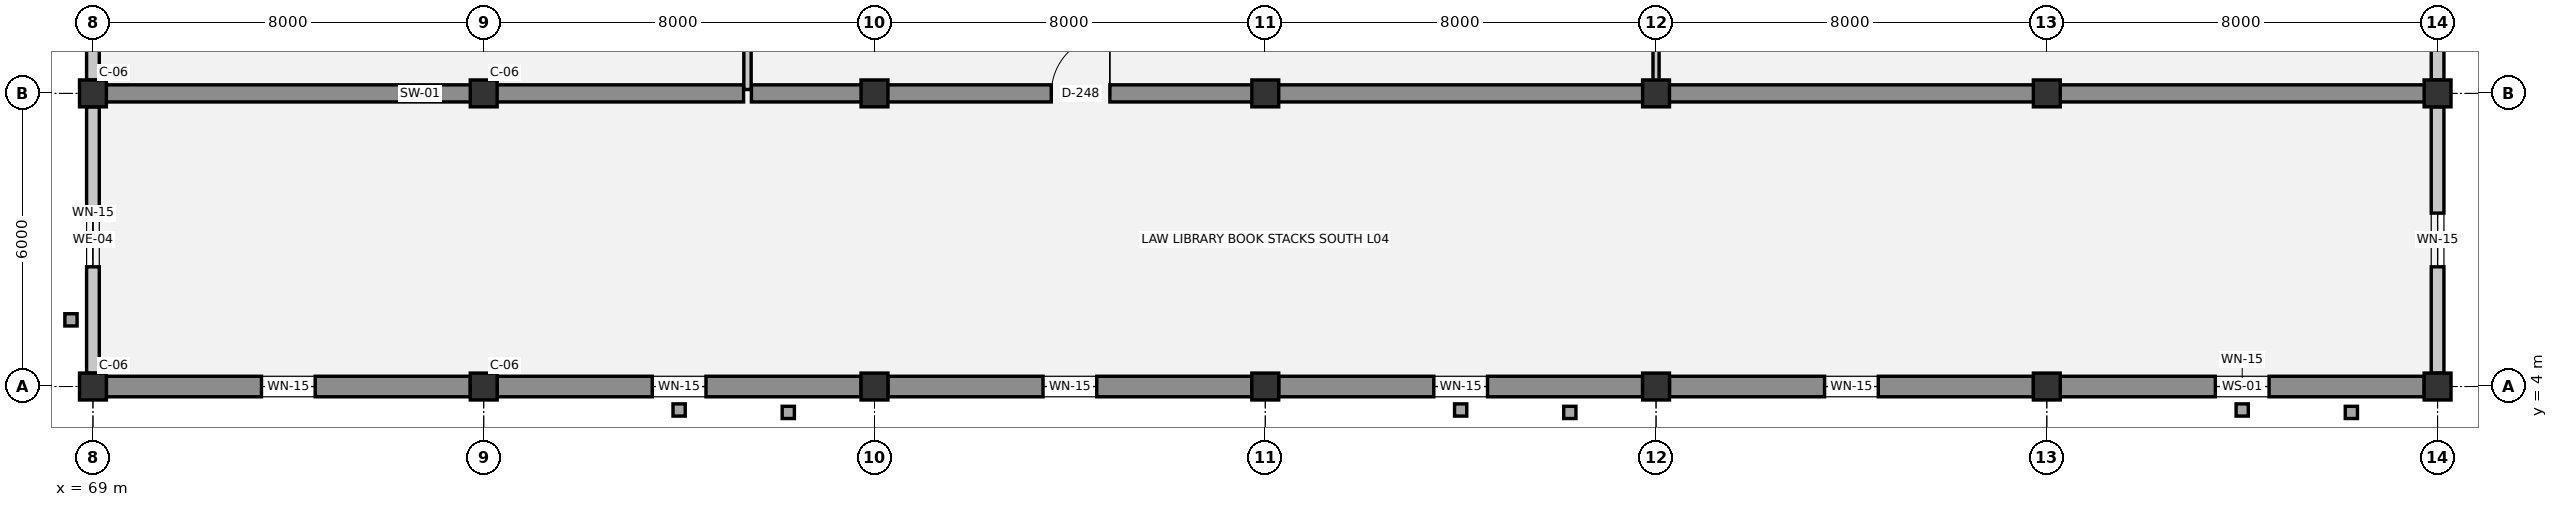
"""IFC4 building model, lengths in metres.
Left out: names, types, materials, properties, quantities, classifications, styles, units other than length and angle.
Written with IfcOpenShell. Run it as: python <this file> out.ifc"""

import sys

from ifc_helpers import new_model, si_unit, direction, frame, frame_2d, origin, origin_2d, place, context, subcontext, project, spatial, rectangle, extrude, element, fill, save


model = new_model("IFC4")
c1 = context("Model", 3, precision=1e-05, world=origin(), true_north=direction((0.0, 1.0)))
c2 = subcontext(c1, "Body", "Model", "MODEL_VIEW")
j1 = project(units=[si_unit("LENGTHUNIT", "METRE"), si_unit("PLANEANGLEUNIT", "RADIAN")], contexts=[c1])
p1 = place(None, origin())
s1 = spatial("IfcSite", under=j1, at=p1, CompositionType="ELEMENT")
p2 = place(p1, origin())
s2 = spatial("IfcBuilding", under=s1, at=p2, CompositionType="ELEMENT")
p3 = place(p2, frame((0.0, 0.0, 14.4)))
s3 = spatial("IfcBuildingStorey", under=s2, at=p3, CompositionType="ELEMENT", Elevation=14.4)
for number, where, z_axis, x_axis in (
    (1, (69.0, 4.0, 0.0), (0.0, 0.0, 1.0), (1.0, 0.0, 0.0)),
    (2, (69.0, 10.0, 0.0), (0.0, 0.0, 1.0), (1.0, 0.0, 0.0)),
    (3, (77.0, 4.0, 0.0), (0.0, 0.0, 1.0), (1.0, 0.0, 0.0)),
    (4, (77.0, 10.0, 0.0), (0.0, 0.0, 1.0), (1.0, 0.0, 0.0)),
    (5, (85.0, 4.0, 0.0), (0.0, 0.0, 1.0), (1.0, 0.0, 0.0)),
    (6, (85.0, 10.0, 0.0), (0.0, 0.0, 1.0), (1.0, 0.0, 0.0)),
    (7, (93.0, 4.0, 0.0), (0.0, 0.0, 1.0), (1.0, 0.0, 0.0)),
    (8, (93.0, 10.0, 0.0), (0.0, 0.0, 1.0), (1.0, 0.0, 0.0)),
    (9, (101.0, 4.0, 0.0), (0.0, 0.0, 1.0), (1.0, 0.0, 0.0)),
    (10, (101.0, 10.0, 0.0), (0.0, 0.0, 1.0), (1.0, 0.0, 0.0)),
    (11, (109.0, 4.0, 0.0), (0.0, 0.0, 1.0), (1.0, 0.0, 0.0)),
    (12, (109.0, 10.0, 0.0), (0.0, 0.0, 1.0), (1.0, 0.0, 0.0)),
    (13, (117.0, 4.0, 0.0), (0.0, 0.0, 1.0), (1.0, 0.0, 0.0)),
    (14, (117.0, 10.0, 0.0), (0.0, 0.0, 1.0), (1.0, 0.0, 0.0)),
):
    element("IfcColumn", number, at=place(p3, frame(where, z_axis=z_axis, x_axis=x_axis)), inside=s3, PredefinedType="COLUMN", context=c2, shape_type="SweptSolid", body=[
        extrude(rectangle(XDim=0.55, YDim=0.55, at=origin_2d()), origin(), (0.0, 0.0, 1.0), 3.9),
    ])
p4 = place(p3, frame((69.0, 4.275, 0.0), z_axis=(0.0, 0.0, 1.0), x_axis=(0.0, 1.0, 0.0)))
e15 = element("IfcWall", 15, at=p4, inside=s3, PredefinedType="SOLIDWALL", context=c2, shape_type="SweptSolid", body=[
    extrude(rectangle(XDim=5.45, YDim=0.26, at=frame_2d((2.725, 0.0))), origin(), (0.0, 0.0, 1.0), 2.84),
])
p5 = place(p4, frame((2.175, 0.0, 0.9)))
e16 = element("IfcOpeningElement", 16, at=p5, cuts=e15, PredefinedType="OPENING", context=c2, shape_type="SweptSolid", body=[
    extrude(rectangle(XDim=1.1, YDim=1.2, at=frame_2d((0.55, 0.6))), frame((0.0, 0.14, 0.0), z_axis=(0.0, -1.0, 0.0), x_axis=(1.0, 0.0, 0.0)), (0.0, 0.0, 1.0), 0.28),
])
p6 = place(p3, frame((69.0, 10.275, 0.0), z_axis=(0.0, 0.0, 1.0), x_axis=(0.0, 1.0, 0.0)))
e17 = element("IfcWall", 17, at=p6, inside=s3, PredefinedType="SOLIDWALL", context=c2, shape_type="SweptSolid", body=[
    extrude(rectangle(XDim=6.45, YDim=0.26, at=frame_2d((3.225, 0.0))), origin(), (0.0, 0.0, 1.0), 2.84),
])
p7 = place(p6, frame((2.125, 0.0, 0.9)))
e18 = element("IfcOpeningElement", 18, at=p7, cuts=e17, PredefinedType="OPENING", context=c2, shape_type="SweptSolid", body=[
    extrude(rectangle(XDim=2.2, YDim=1.0, at=frame_2d((1.1, 0.5))), frame((0.0, 0.14, 0.0), z_axis=(0.0, -1.0, 0.0), x_axis=(1.0, 0.0, 0.0)), (0.0, 0.0, 1.0), 0.28),
])
p8 = place(p3, frame((117.0, 16.725, 0.0), z_axis=(0.0, 0.0, 1.0), x_axis=(0.0, -1.0, 0.0)))
e19 = element("IfcWall", 19, at=p8, inside=s3, PredefinedType="SOLIDWALL", context=c2, shape_type="SweptSolid", body=[
    extrude(rectangle(XDim=6.45, YDim=0.26, at=frame_2d((3.225, 0.0))), origin(), (0.0, 0.0, 1.0), 2.84),
])
p9 = place(p8, frame((2.125, 0.0, 0.9)))
e20 = element("IfcOpeningElement", 20, at=p9, cuts=e19, PredefinedType="OPENING", context=c2, shape_type="SweptSolid", body=[
    extrude(rectangle(XDim=2.2, YDim=1.0, at=frame_2d((1.1, 0.5))), frame((0.0, 0.14, 0.0), z_axis=(0.0, -1.0, 0.0), x_axis=(1.0, 0.0, 0.0)), (0.0, 0.0, 1.0), 0.28),
])
p10 = place(p3, frame((117.0, 9.725, 0.0), z_axis=(0.0, 0.0, 1.0), x_axis=(0.0, -1.0, 0.0)))
e21 = element("IfcWall", 21, at=p10, inside=s3, PredefinedType="SOLIDWALL", context=c2, shape_type="SweptSolid", body=[
    extrude(rectangle(XDim=5.45, YDim=0.26, at=frame_2d((2.725, 0.0))), origin(), (0.0, 0.0, 1.0), 2.84),
])
p11 = place(p10, frame((2.175, 0.0, 0.9)))
e22 = element("IfcOpeningElement", 22, at=p11, cuts=e21, PredefinedType="OPENING", context=c2, shape_type="SweptSolid", body=[
    extrude(rectangle(XDim=1.1, YDim=1.2, at=frame_2d((0.55, 0.6))), frame((0.0, 0.14, 0.0), z_axis=(0.0, -1.0, 0.0), x_axis=(1.0, 0.0, 0.0)), (0.0, 0.0, 1.0), 0.28),
])
p12 = place(p3, frame((116.725, 4.0, 0.0), z_axis=(0.0, 0.0, 1.0), x_axis=(-1.0, 0.0, 0.0)))
e23 = element("IfcWall", 23, at=p12, inside=s3, PredefinedType="SOLIDWALL", context=c2, shape_type="SweptSolid", body=[
    extrude(rectangle(XDim=7.45, YDim=0.42, at=frame_2d((3.725, 0.0))), origin(), (0.0, 0.0, 1.0), 2.84),
])
p13 = place(p12, frame((3.175, 0.0, 0.9)))
e24 = element("IfcOpeningElement", 24, at=p13, cuts=e23, PredefinedType="OPENING", context=c2, shape_type="SweptSolid", body=[
    extrude(rectangle(XDim=1.1, YDim=1.2, at=frame_2d((0.55, 0.6))), frame((0.0, 0.22, 0.0), z_axis=(0.0, -1.0, 0.0), x_axis=(1.0, 0.0, 0.0)), (0.0, 0.0, 1.0), 0.44),
])
p14 = place(p3, frame((108.725, 4.0, 0.0), z_axis=(0.0, 0.0, 1.0), x_axis=(-1.0, 0.0, 0.0)))
e25 = element("IfcWall", 25, at=p14, inside=s3, PredefinedType="SOLIDWALL", context=c2, shape_type="SweptSolid", body=[
    extrude(rectangle(XDim=7.45, YDim=0.42, at=frame_2d((3.725, 0.0))), origin(), (0.0, 0.0, 1.0), 2.84),
])
p15 = place(p14, frame((3.175, 0.0, 0.9)))
e26 = element("IfcOpeningElement", 26, at=p15, cuts=e25, PredefinedType="OPENING", context=c2, shape_type="SweptSolid", body=[
    extrude(rectangle(XDim=1.1, YDim=1.2, at=frame_2d((0.55, 0.6))), frame((0.0, 0.22, 0.0), z_axis=(0.0, -1.0, 0.0), x_axis=(1.0, 0.0, 0.0)), (0.0, 0.0, 1.0), 0.44),
])
p16 = place(p3, frame((100.725, 4.0, 0.0), z_axis=(0.0, 0.0, 1.0), x_axis=(-1.0, 0.0, 0.0)))
e27 = element("IfcWall", 27, at=p16, inside=s3, PredefinedType="SOLIDWALL", context=c2, shape_type="SweptSolid", body=[
    extrude(rectangle(XDim=7.45, YDim=0.42, at=frame_2d((3.725, 0.0))), origin(), (0.0, 0.0, 1.0), 2.84),
])
p17 = place(p16, frame((3.175, 0.0, 0.9)))
e28 = element("IfcOpeningElement", 28, at=p17, cuts=e27, PredefinedType="OPENING", context=c2, shape_type="SweptSolid", body=[
    extrude(rectangle(XDim=1.1, YDim=1.2, at=frame_2d((0.55, 0.6))), frame((0.0, 0.22, 0.0), z_axis=(0.0, -1.0, 0.0), x_axis=(1.0, 0.0, 0.0)), (0.0, 0.0, 1.0), 0.44),
])
p18 = place(p3, frame((92.725, 4.0, 0.0), z_axis=(0.0, 0.0, 1.0), x_axis=(-1.0, 0.0, 0.0)))
e29 = element("IfcWall", 29, at=p18, inside=s3, PredefinedType="SOLIDWALL", context=c2, shape_type="SweptSolid", body=[
    extrude(rectangle(XDim=7.45, YDim=0.42, at=frame_2d((3.725, 0.0))), origin(), (0.0, 0.0, 1.0), 2.84),
])
p19 = place(p18, frame((3.175, 0.0, 0.9)))
e30 = element("IfcOpeningElement", 30, at=p19, cuts=e29, PredefinedType="OPENING", context=c2, shape_type="SweptSolid", body=[
    extrude(rectangle(XDim=1.1, YDim=1.2, at=frame_2d((0.55, 0.6))), frame((0.0, 0.22, 0.0), z_axis=(0.0, -1.0, 0.0), x_axis=(1.0, 0.0, 0.0)), (0.0, 0.0, 1.0), 0.44),
])
p20 = place(p3, frame((84.725, 4.0, 0.0), z_axis=(0.0, 0.0, 1.0), x_axis=(-1.0, 0.0, 0.0)))
e31 = element("IfcWall", 31, at=p20, inside=s3, PredefinedType="SOLIDWALL", context=c2, shape_type="SweptSolid", body=[
    extrude(rectangle(XDim=7.45, YDim=0.42, at=frame_2d((3.725, 0.0))), origin(), (0.0, 0.0, 1.0), 2.84),
])
p21 = place(p20, frame((3.175, 0.0, 0.9)))
e32 = element("IfcOpeningElement", 32, at=p21, cuts=e31, PredefinedType="OPENING", context=c2, shape_type="SweptSolid", body=[
    extrude(rectangle(XDim=1.1, YDim=1.2, at=frame_2d((0.55, 0.6))), frame((0.0, 0.22, 0.0), z_axis=(0.0, -1.0, 0.0), x_axis=(1.0, 0.0, 0.0)), (0.0, 0.0, 1.0), 0.44),
])
p22 = place(p3, frame((76.725, 4.0, 0.0), z_axis=(0.0, 0.0, 1.0), x_axis=(-1.0, 0.0, 0.0)))
e33 = element("IfcWall", 33, at=p22, inside=s3, PredefinedType="SOLIDWALL", context=c2, shape_type="SweptSolid", body=[
    extrude(rectangle(XDim=7.45, YDim=0.42, at=frame_2d((3.725, 0.0))), origin(), (0.0, 0.0, 1.0), 2.84),
])
p23 = place(p22, frame((3.175, 0.0, 0.9)))
e34 = element("IfcOpeningElement", 34, at=p23, cuts=e33, PredefinedType="OPENING", context=c2, shape_type="SweptSolid", body=[
    extrude(rectangle(XDim=1.1, YDim=1.2, at=frame_2d((0.55, 0.6))), frame((0.0, 0.22, 0.0), z_axis=(0.0, -1.0, 0.0), x_axis=(1.0, 0.0, 0.0)), (0.0, 0.0, 1.0), 0.44),
])
p24 = place(p3, frame((69.08, 10.0, 0.0), z_axis=(0.0, 0.0, 1.0), x_axis=(1.0, 0.0, 0.0)))
e35 = element("IfcWall", 35, at=p24, inside=s3, PredefinedType="SHEAR", context=c2, shape_type="SweptSolid", body=[
    extrude(rectangle(XDim=13.24, YDim=0.35, at=frame_2d((6.62, 0.0))), origin(), (0.0, 0.0, 1.0), 3.54),
])
p25 = place(p3, frame((82.48, 10.0, 0.0), z_axis=(0.0, 0.0, 1.0), x_axis=(1.0, 0.0, 0.0)))
e36 = element("IfcWall", 36, at=p25, inside=s3, PredefinedType="SHEAR", context=c2, shape_type="SweptSolid", body=[
    extrude(rectangle(XDim=18.44, YDim=0.35, at=frame_2d((9.22, 0.0))), origin(), (0.0, 0.0, 1.0), 3.54),
])
p26 = place(p25, frame((6.139, 0.0, 0.0)))
e37 = element("IfcOpeningElement", 37, at=p26, cuts=e36, PredefinedType="OPENING", context=c2, shape_type="SweptSolid", body=[
    extrude(rectangle(XDim=1.2, YDim=2.15, at=frame_2d((0.6, 1.075))), frame((0.0, 0.185, 0.0), z_axis=(0.0, -1.0, 0.0), x_axis=(1.0, 0.0, 0.0)), (0.0, 0.0, 1.0), 0.37),
])
p27 = place(p3, frame((101.08, 10.0, 0.0), z_axis=(0.0, 0.0, 1.0), x_axis=(1.0, 0.0, 0.0)))
e38 = element("IfcWall", 38, at=p27, inside=s3, PredefinedType="SHEAR", context=c2, shape_type="SweptSolid", body=[
    extrude(rectangle(XDim=15.84, YDim=0.35, at=frame_2d((7.92, 0.0))), origin(), (0.0, 0.0, 1.0), 3.54),
])
p28 = place(p3, frame((82.4, 10.08, 0.0), z_axis=(0.0, 0.0, 1.0), x_axis=(0.0, 1.0, 0.0)))
e39 = element("IfcWall", 39, at=p28, inside=s3, PredefinedType="PARTITIONING", context=c2, shape_type="SweptSolid", body=[
    extrude(rectangle(XDim=14.84, YDim=0.15, at=frame_2d((7.42, 0.0))), origin(), (0.0, 0.0, 1.0), 3.54),
])
p29 = place(p28, frame((6.97, 0.0, 0.0)))
e40 = element("IfcOpeningElement", 40, at=p29, cuts=e39, PredefinedType="OPENING", context=c2, shape_type="SweptSolid", body=[
    extrude(rectangle(XDim=0.9, YDim=2.15, at=frame_2d((0.45, 1.075))), frame((0.0, 0.085, 0.0), z_axis=(0.0, -1.0, 0.0), x_axis=(1.0, 0.0, 0.0)), (0.0, 0.0, 1.0), 0.17),
])
p30 = place(p3, frame((101.0, 10.08, 0.0), z_axis=(0.0, 0.0, 1.0), x_axis=(0.0, 1.0, 0.0)))
e41 = element("IfcWall", 41, at=p30, inside=s3, PredefinedType="PARTITIONING", context=c2, shape_type="SweptSolid", body=[
    extrude(rectangle(XDim=1.52, YDim=0.125, at=frame_2d((0.76, 0.0))), origin(), (0.0, 0.0, 1.0), 3.01),
])
p31 = place(p5, origin())
e42 = element("IfcWindow", 42, at=p31, inside=s3, PartitioningType="SINGLE_PANEL", PredefinedType="WINDOW", context=c2, shape_type="SweptSolid", body=[
    extrude(rectangle(XDim=1.1, YDim=1.2, at=frame_2d((0.55, 0.6))), frame((0.0, 0.03, 0.0), z_axis=(0.0, -1.0, 0.0), x_axis=(1.0, 0.0, 0.0)), (0.0, 0.0, 1.0), 0.06),
])
fill(e16, e42)
p32 = place(p11, origin())
e43 = element("IfcWindow", 43, at=p32, inside=s3, PartitioningType="SINGLE_PANEL", PredefinedType="WINDOW", context=c2, shape_type="SweptSolid", body=[
    extrude(rectangle(XDim=1.1, YDim=1.2, at=frame_2d((0.55, 0.6))), frame((0.0, 0.03, 0.0), z_axis=(0.0, -1.0, 0.0), x_axis=(1.0, 0.0, 0.0)), (0.0, 0.0, 1.0), 0.06),
])
fill(e22, e43)
p33 = place(p13, origin())
e44 = element("IfcWindow", 44, at=p33, inside=s3, PartitioningType="SINGLE_PANEL", PredefinedType="WINDOW", context=c2, shape_type="SweptSolid", body=[
    extrude(rectangle(XDim=1.1, YDim=1.2, at=frame_2d((0.55, 0.6))), frame((0.0, 0.03, 0.0), z_axis=(0.0, -1.0, 0.0), x_axis=(1.0, 0.0, 0.0)), (0.0, 0.0, 1.0), 0.06),
])
fill(e24, e44)
p34 = place(p15, origin())
e45 = element("IfcWindow", 45, at=p34, inside=s3, PartitioningType="SINGLE_PANEL", PredefinedType="WINDOW", context=c2, shape_type="SweptSolid", body=[
    extrude(rectangle(XDim=1.1, YDim=1.2, at=frame_2d((0.55, 0.6))), frame((0.0, 0.03, 0.0), z_axis=(0.0, -1.0, 0.0), x_axis=(1.0, 0.0, 0.0)), (0.0, 0.0, 1.0), 0.06),
])
fill(e26, e45)
p35 = place(p17, origin())
e46 = element("IfcWindow", 46, at=p35, inside=s3, PartitioningType="SINGLE_PANEL", PredefinedType="WINDOW", context=c2, shape_type="SweptSolid", body=[
    extrude(rectangle(XDim=1.1, YDim=1.2, at=frame_2d((0.55, 0.6))), frame((0.0, 0.03, 0.0), z_axis=(0.0, -1.0, 0.0), x_axis=(1.0, 0.0, 0.0)), (0.0, 0.0, 1.0), 0.06),
])
fill(e28, e46)
p36 = place(p19, origin())
e47 = element("IfcWindow", 47, at=p36, inside=s3, PartitioningType="SINGLE_PANEL", PredefinedType="WINDOW", context=c2, shape_type="SweptSolid", body=[
    extrude(rectangle(XDim=1.1, YDim=1.2, at=frame_2d((0.55, 0.6))), frame((0.0, 0.03, 0.0), z_axis=(0.0, -1.0, 0.0), x_axis=(1.0, 0.0, 0.0)), (0.0, 0.0, 1.0), 0.06),
])
fill(e30, e47)
p37 = place(p21, origin())
e48 = element("IfcWindow", 48, at=p37, inside=s3, PartitioningType="SINGLE_PANEL", PredefinedType="WINDOW", context=c2, shape_type="SweptSolid", body=[
    extrude(rectangle(XDim=1.1, YDim=1.2, at=frame_2d((0.55, 0.6))), frame((0.0, 0.03, 0.0), z_axis=(0.0, -1.0, 0.0), x_axis=(1.0, 0.0, 0.0)), (0.0, 0.0, 1.0), 0.06),
])
fill(e32, e48)
p38 = place(p23, origin())
e49 = element("IfcWindow", 49, at=p38, inside=s3, PartitioningType="SINGLE_PANEL", PredefinedType="WINDOW", context=c2, shape_type="SweptSolid", body=[
    extrude(rectangle(XDim=1.1, YDim=1.2, at=frame_2d((0.55, 0.6))), frame((0.0, 0.03, 0.0), z_axis=(0.0, -1.0, 0.0), x_axis=(1.0, 0.0, 0.0)), (0.0, 0.0, 1.0), 0.06),
])
fill(e34, e49)
p39 = place(p26, origin())
e50 = element("IfcDoor", 50, at=p39, inside=s3, OperationType="SINGLE_SWING_RIGHT", PredefinedType="DOOR", context=c2, shape_type="SweptSolid", body=[
    extrude(rectangle(XDim=1.2, YDim=2.15, at=frame_2d((0.6, 1.075))), frame((0.0, 0.025, 0.0), z_axis=(0.0, -1.0, 0.0), x_axis=(1.0, 0.0, 0.0)), (0.0, 0.0, 1.0), 0.05),
])
fill(e37, e50)
save(model, sys.argv[1])
